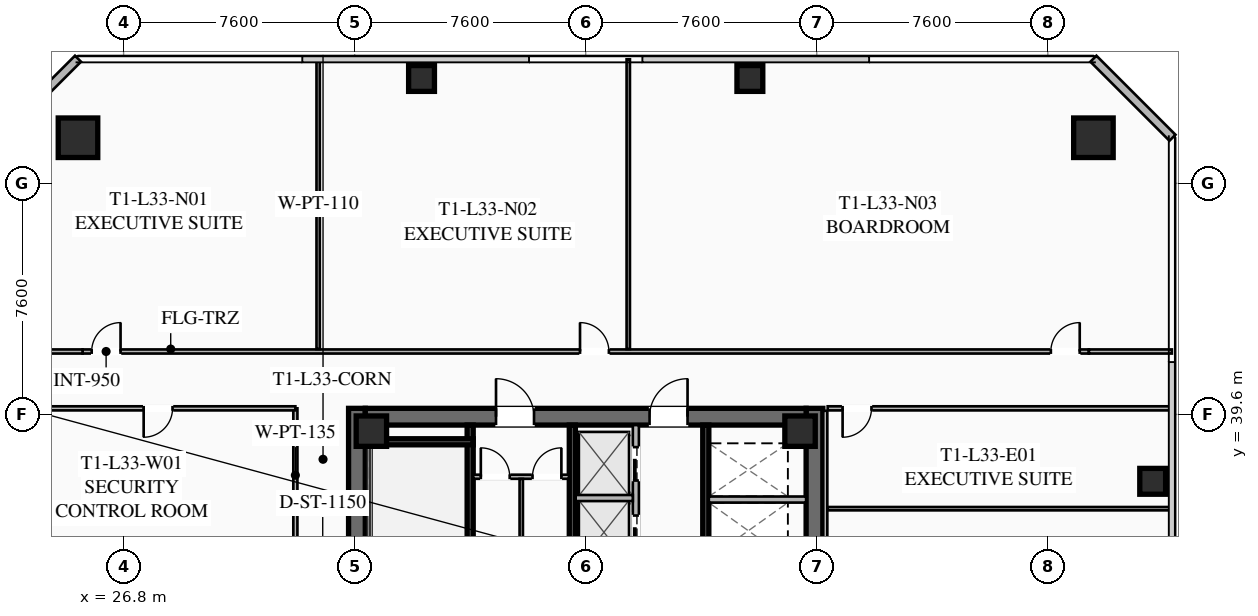
"""IFC4 building model, lengths in metres.
Left out: names, types, materials, properties, quantities, classifications, styles, units other than length and angle.
Written with IfcOpenShell. Run it as: python <this file> out.ifc"""

import sys

from ifc_helpers import new_model, si_unit, direction, frame, frame_2d, origin, origin_2d, place, context, subcontext, project, spatial, rectangle, hollow_rectangle, extrude, element, fill, save


model = new_model("IFC4")
c1 = context("Model", 3, precision=1e-05, world=origin(), true_north=direction((0.0, 1.0)))
c2 = subcontext(c1, "Body", "Model", "MODEL_VIEW")
j1 = project(units=[si_unit("LENGTHUNIT", "METRE"), si_unit("PLANEANGLEUNIT", "RADIAN")], contexts=[c1])
p1 = place(None, origin())
s1 = spatial("IfcSite", under=j1, at=p1, CompositionType="ELEMENT")
p2 = place(p1, origin())
s2 = spatial("IfcBuilding", under=s1, at=p2, CompositionType="ELEMENT")
p3 = place(p2, frame((0.0, 0.0, 125.05)))
s3 = spatial("IfcBuildingStorey", under=s2, at=p3, CompositionType="ELEMENT", Elevation=125.05)
for number, where, z_axis, x_axis in (
    (1, (34.475, 24.2, 0.0), (0.0, 0.0, 1.0), (0.0, 1.0, 0.0)),
    (2, (49.525, 39.8, 0.0), (0.0, 0.0, 1.0), (0.0, -1.0, 0.0)),
):
    element("IfcWall", number, at=place(p3, frame(where, z_axis=z_axis, x_axis=x_axis)), inside=s3, PredefinedType="SHEAR", context=c2, shape_type="SweptSolid", body=[
        extrude(rectangle(XDim=15.6, YDim=0.55, at=frame_2d((7.8, 0.0))), origin(), (0.0, 0.0, 1.0), 3.55),
    ])
p4 = place(p3, frame((34.75, 39.525, 0.0), z_axis=(0.0, 0.0, 1.0), x_axis=(1.0, 0.0, 0.0)))
e3 = element("IfcWall", 3, at=p4, inside=s3, PredefinedType="SHEAR", context=c2, shape_type="SweptSolid", body=[
    extrude(rectangle(XDim=14.5, YDim=0.55, at=frame_2d((7.25, 0.0))), origin(), (0.0, 0.0, 1.0), 3.55),
])
p5 = place(p4, frame((4.3, 0.0, 0.0)))
e4 = element("IfcOpeningElement", 4, at=p5, cuts=e3, PredefinedType="OPENING", context=c2, shape_type="SweptSolid", body=[
    extrude(rectangle(XDim=1.25, YDim=2.25, at=frame_2d((0.625, 1.125))), frame((0.0, 0.285, 0.0), z_axis=(0.0, -1.0, 0.0), x_axis=(1.0, 0.0, 0.0)), (0.0, 0.0, 1.0), 0.57),
])
p6 = place(p4, frame((9.35, 0.0, 0.0)))
e5 = element("IfcOpeningElement", 5, at=p6, cuts=e3, PredefinedType="OPENING", context=c2, shape_type="SweptSolid", body=[
    extrude(rectangle(XDim=1.25, YDim=2.25, at=frame_2d((0.625, 1.125))), frame((0.0, 0.285, 0.0), z_axis=(0.0, -1.0, 0.0), x_axis=(1.0, 0.0, 0.0)), (0.0, 0.0, 1.0), 0.57),
])
for number, where, z_axis, x_axis in (
    (6, (49.05, 39.05, 0.0), (0.0, 0.0, 1.0), (1.0, 0.0, 0.0)),
    (7, (34.95, 39.05, 0.0), (0.0, 0.0, 1.0), (1.0, 0.0, 0.0)),
):
    element("IfcColumn", number, at=place(p3, frame(where, z_axis=z_axis, x_axis=x_axis)), inside=s3, PredefinedType="COLUMN", context=c2, shape_type="SweptSolid", body=[
        extrude(hollow_rectangle(XDim=1.0, YDim=1.0, WallThickness=0.04, at=origin_2d()), origin(), (0.0, 0.0, 1.0), 3.37),
    ])
for number, where, z_axis, x_axis in (
    (8, (58.7, 48.7, 0.0), (0.0, 0.0, 1.0), (1.0, 0.0, 0.0)),
    (9, (25.3, 48.7, 0.0), (0.0, 0.0, 1.0), (1.0, 0.0, 0.0)),
):
    element("IfcColumn", number, at=place(p3, frame(where, z_axis=z_axis, x_axis=x_axis)), inside=s3, PredefinedType="COLUMN", context=c2, shape_type="SweptSolid", body=[
        extrude(hollow_rectangle(XDim=1.3, YDim=1.3, WallThickness=0.05, at=origin_2d()), origin(), (0.0, 0.0, 1.0), 3.37),
    ])
for number, where, z_axis, x_axis in (
    (10, (60.65, 37.4, 0.0), (0.0, 0.0, 1.0), (1.0, 0.0, 0.0)),
    (11, (47.4, 50.65, 0.0), (0.0, 0.0, 1.0), (1.0, 0.0, 0.0)),
    (12, (36.6, 50.65, 0.0), (0.0, 0.0, 1.0), (1.0, 0.0, 0.0)),
):
    element("IfcColumn", number, at=place(p3, frame(where, z_axis=z_axis, x_axis=x_axis)), inside=s3, PredefinedType="COLUMN", context=c2, shape_type="SweptSolid", body=[
        extrude(hollow_rectangle(XDim=0.85, YDim=0.85, WallThickness=0.035, at=origin_2d()), origin(), (0.0, 0.0, 1.0), 3.37),
    ])
for number, where, z_axis, x_axis in (
    (13, (22.7, 48.7, 0.0), (0.0, 0.0, 1.0), (0.707, 0.707, 0.0)),
    (14, (58.7, 51.3, 0.0), (0.0, 0.0, 1.0), (0.707, -0.707, 0.0)),
):
    element("IfcWall", number, at=place(p3, frame(where, z_axis=z_axis, x_axis=x_axis)), inside=s3, PredefinedType="SOLIDWALL", context=c2, shape_type="SweptSolid", body=[
        extrude(rectangle(XDim=3.677, YDim=0.28, at=frame_2d((1.838, 0.0))), origin(), (0.0, 0.0, 1.0), 3.37),
    ])
p7 = place(p3, frame((38.2, 31.2, 0.0), z_axis=(0.0, 0.0, 1.0), x_axis=(0.0, 1.0, 0.0)))
e15 = element("IfcWall", 15, at=p7, inside=s3, PredefinedType="SHEAR", context=c2, shape_type="SweptSolid", body=[
    extrude(rectangle(XDim=8.05, YDim=0.2, at=frame_2d((4.025, 0.0))), origin(), (0.0, 0.0, 1.0), 3.37),
])
p8 = place(p7, frame((0.45, 0.0, 0.0)))
e16 = element("IfcOpeningElement", 16, at=p8, cuts=e15, PredefinedType="OPENING", context=c2, shape_type="SweptSolid", body=[
    extrude(rectangle(XDim=1.15, YDim=2.2, at=frame_2d((0.575, 1.1))), frame((0.0, 0.11, 0.0), z_axis=(0.0, -1.0, 0.0), x_axis=(1.0, 0.0, 0.0)), (0.0, 0.0, 1.0), 0.22),
])
p9 = place(p3, frame((34.75, 38.7, 0.0), z_axis=(0.0, 0.0, 1.0), x_axis=(1.0, 0.0, 0.0)))
e17 = element("IfcWall", 17, at=p9, inside=s3, PredefinedType="SHEAR", context=c2, shape_type="SweptSolid", body=[
    extrude(rectangle(XDim=3.55, YDim=0.2, at=frame_2d((1.775, 0.0))), origin(), (0.0, 0.0, 1.0), 3.37),
])
p10 = place(p3, frame((41.56, 24.75, 0.0), z_axis=(0.0, 0.0, 1.0), x_axis=(0.0, 1.0, 0.0)))
e18 = element("IfcWall", 18, at=p10, inside=s3, PredefinedType="SHEAR", context=c2, shape_type="SweptSolid", body=[
    extrude(rectangle(XDim=14.5, YDim=0.2, at=frame_2d((7.25, 0.0))), origin(), (0.0, 0.0, 1.0), 3.37),
])
p11 = place(p3, frame((45.95, 39.25, 0.0), z_axis=(0.0, 0.0, 1.0), x_axis=(0.0, -1.0, 0.0)))
e19 = element("IfcWall", 19, at=p11, inside=s3, PredefinedType="SHEAR", context=c2, shape_type="SweptSolid", body=[
    extrude(rectangle(XDim=6.45, YDim=0.2, at=frame_2d((3.225, 0.0))), origin(), (0.0, 0.0, 1.0), 3.37),
])
p12 = place(p3, frame((46.05, 36.8, 0.0), z_axis=(0.0, 0.0, 1.0), x_axis=(1.0, 0.0, 0.0)))
e20 = element("IfcWall", 20, at=p12, inside=s3, PredefinedType="SOLIDWALL", context=c2, shape_type="SweptSolid", body=[
    extrude(rectangle(XDim=3.2, YDim=0.2, at=frame_2d((1.6, 0.0))), origin(), (0.0, 0.0, 1.0), 3.37),
])
p13 = place(p3, frame((38.3, 37.55, 0.0), z_axis=(0.0, 0.0, 1.0), x_axis=(1.0, 0.0, 0.0)))
e21 = element("IfcWall", 21, at=p13, inside=s3, PredefinedType="PARTITIONING", context=c2, shape_type="SweptSolid", body=[
    extrude(rectangle(XDim=3.15, YDim=0.135, at=frame_2d((1.575, 0.0))), origin(), (0.0, 0.0, 1.0), 2.723),
])
p14 = place(p13, frame((0.25, 0.0, 0.0)))
e22 = element("IfcOpeningElement", 22, at=p14, cuts=e21, PredefinedType="OPENING", context=c2, shape_type="SweptSolid", body=[
    extrude(rectangle(XDim=0.95, YDim=2.05, at=frame_2d((0.475, 1.025))), frame((0.0, 0.077, 0.0), z_axis=(0.0, -1.0, 0.0), x_axis=(1.0, 0.0, 0.0)), (0.0, 0.0, 1.0), 0.155),
])
p15 = place(p13, frame((1.95, 0.0, 0.0)))
e23 = element("IfcOpeningElement", 23, at=p15, cuts=e21, PredefinedType="OPENING", context=c2, shape_type="SweptSolid", body=[
    extrude(rectangle(XDim=0.95, YDim=2.05, at=frame_2d((0.475, 1.025))), frame((0.0, 0.077, 0.0), z_axis=(0.0, -1.0, 0.0), x_axis=(1.0, 0.0, 0.0)), (0.0, 0.0, 1.0), 0.155),
])
p16 = place(p3, frame((39.88, 33.68, 0.0), z_axis=(0.0, 0.0, 1.0), x_axis=(0.0, 1.0, 0.0)))
e24 = element("IfcWall", 24, at=p16, inside=s3, PredefinedType="PARTITIONING", context=c2, shape_type="SweptSolid", body=[
    extrude(rectangle(XDim=3.8, YDim=0.11, at=frame_2d((1.9, 0.0))), origin(), (0.0, 0.0, 1.0), 2.723),
])
p17 = place(p3, frame((43.65, 32.35, 0.0), z_axis=(0.0, 0.0, 1.0), x_axis=(0.0, 1.0, 0.0)))
e25 = element("IfcWall", 25, at=p17, inside=s3, PredefinedType="SOLIDWALL", context=c2, shape_type="SweptSolid", body=[
    extrude(rectangle(XDim=6.9, YDim=0.2, at=frame_2d((3.45, 0.0))), origin(), (0.0, 0.0, 1.0), 3.37),
])
p18 = place(p17, frame((0.575, 0.0, 0.0)))
e26 = element("IfcOpeningElement", 26, at=p18, cuts=e25, PredefinedType="OPENING", context=c2, shape_type="SweptSolid", body=[
    extrude(rectangle(XDim=1.1, YDim=2.2, at=frame_2d((0.55, 1.1))), frame((0.0, 0.11, 0.0), z_axis=(0.0, -1.0, 0.0), x_axis=(1.0, 0.0, 0.0)), (0.0, 0.0, 1.0), 0.22),
])
p19 = place(p17, frame((2.825, 0.0, 0.0)))
e27 = element("IfcOpeningElement", 27, at=p19, cuts=e25, PredefinedType="OPENING", context=c2, shape_type="SweptSolid", body=[
    extrude(rectangle(XDim=1.1, YDim=2.2, at=frame_2d((0.55, 1.1))), frame((0.0, 0.11, 0.0), z_axis=(0.0, -1.0, 0.0), x_axis=(1.0, 0.0, 0.0)), (0.0, 0.0, 1.0), 0.22),
])
p20 = place(p17, frame((5.075, 0.0, 0.0)))
e28 = element("IfcOpeningElement", 28, at=p20, cuts=e25, PredefinedType="OPENING", context=c2, shape_type="SweptSolid", body=[
    extrude(rectangle(XDim=1.1, YDim=2.2, at=frame_2d((0.55, 1.1))), frame((0.0, 0.11, 0.0), z_axis=(0.0, -1.0, 0.0), x_axis=(1.0, 0.0, 0.0)), (0.0, 0.0, 1.0), 0.22),
])
p21 = place(p3, frame((41.67, 36.85, 0.0), z_axis=(0.0, 0.0, 1.0), x_axis=(1.0, 0.0, 0.0)))
e29 = element("IfcWall", 29, at=p21, inside=s3, PredefinedType="SOLIDWALL", context=c2, shape_type="SweptSolid", body=[
    extrude(rectangle(XDim=1.88, YDim=0.2, at=frame_2d((0.94, 0.0))), origin(), (0.0, 0.0, 1.0), 3.37),
])
p22 = place(p3, frame((32.45, 35.4, 0.0), z_axis=(0.0, 0.0, 1.0), x_axis=(0.0, 1.0, 0.0)))
e30 = element("IfcWall", 30, at=p22, inside=s3, PredefinedType="PARTITIONING", context=c2, shape_type="SweptSolid", body=[
    extrude(rectangle(XDim=4.4, YDim=0.135, at=frame_2d((2.2, 0.0))), origin(), (0.0, 0.0, 1.0), 2.723),
])
p23 = place(p3, frame((25.45, 41.67, 0.0), z_axis=(0.0, 0.0, 1.0), x_axis=(1.0, 0.0, 0.0)))
e31 = element("IfcWall", 31, at=p23, inside=s3, PredefinedType="PARTITIONING", context=c2, shape_type="SweptSolid", body=[
    extrude(rectangle(XDim=33.1, YDim=0.135, at=frame_2d((16.55, 0.0))), origin(), (0.0, 0.0, 1.0), 2.723),
])
p24 = place(p23, frame((0.3, 0.0, 0.0)))
e32 = element("IfcOpeningElement", 32, at=p24, cuts=e31, PredefinedType="OPENING", context=c2, shape_type="SweptSolid", body=[
    extrude(rectangle(XDim=0.95, YDim=2.05, at=frame_2d((0.475, 1.025))), frame((0.0, 0.077, 0.0), z_axis=(0.0, -1.0, 0.0), x_axis=(1.0, 0.0, 0.0)), (0.0, 0.0, 1.0), 0.155),
])
p25 = place(p23, frame((16.363, 0.0, 0.0)))
e33 = element("IfcOpeningElement", 33, at=p25, cuts=e31, PredefinedType="OPENING", context=c2, shape_type="SweptSolid", body=[
    extrude(rectangle(XDim=0.95, YDim=2.05, at=frame_2d((0.475, 1.025))), frame((0.0, 0.077, 0.0), z_axis=(0.0, -1.0, 0.0), x_axis=(1.0, 0.0, 0.0)), (0.0, 0.0, 1.0), 0.155),
])
p26 = place(p23, frame((31.85, 0.0, 0.0)))
e34 = element("IfcOpeningElement", 34, at=p26, cuts=e31, PredefinedType="OPENING", context=c2, shape_type="SweptSolid", body=[
    extrude(rectangle(XDim=0.95, YDim=2.05, at=frame_2d((0.475, 1.025))), frame((0.0, 0.077, 0.0), z_axis=(0.0, -1.0, 0.0), x_axis=(1.0, 0.0, 0.0)), (0.0, 0.0, 1.0), 0.155),
])
for number, where, z_axis, x_axis in (
    (35, (22.72, 41.67, 0.0), (0.0, 0.0, 1.0), (1.0, 0.0, 0.0)),
    (36, (58.55, 41.67, 0.0), (0.0, 0.0, 1.0), (1.0, 0.0, 0.0)),
):
    element("IfcWall", number, at=place(p3, frame(where, z_axis=z_axis, x_axis=x_axis)), inside=s3, PredefinedType="PARTITIONING", context=c2, shape_type="SweptSolid", body=[
        extrude(rectangle(XDim=2.73, YDim=0.135, at=frame_2d((1.365, 0.0))), origin(), (0.0, 0.0, 1.0), 2.723),
    ])
for number, where, z_axis, x_axis in (
    (37, (33.2, 41.75, 0.0), (0.0, 0.0, 1.0), (0.0, 1.0, 0.0)),
    (38, (43.4, 41.75, 0.0), (0.0, 0.0, 1.0), (0.0, 1.0, 0.0)),
):
    element("IfcWall", number, at=place(p3, frame(where, z_axis=z_axis, x_axis=x_axis)), inside=s3, PredefinedType="PARTITIONING", context=c2, shape_type="SweptSolid", body=[
        extrude(rectangle(XDim=9.53, YDim=0.11, at=frame_2d((4.765, 0.0))), origin(), (0.0, 0.0, 1.0), 2.723),
    ])
p27 = place(p3, frame((49.88, 39.72, 0.0), z_axis=(0.0, 0.0, 1.0), x_axis=(0.0, -1.0, 0.0)))
e39 = element("IfcWall", 39, at=p27, inside=s3, PredefinedType="PARTITIONING", context=c2, shape_type="SweptSolid", body=[
    extrude(rectangle(XDim=15.44, YDim=0.135, at=frame_2d((7.72, 0.0))), origin(), (0.0, 0.0, 1.0), 2.723),
])
p28 = place(p3, frame((61.28, 39.8, 0.0), z_axis=(0.0, 0.0, 1.0), x_axis=(-1.0, 0.0, 0.0)))
e40 = element("IfcWall", 40, at=p28, inside=s3, PredefinedType="PARTITIONING", context=c2, shape_type="SweptSolid", body=[
    extrude(rectangle(XDim=11.32, YDim=0.135, at=frame_2d((5.66, 0.0))), origin(), (0.0, 0.0, 1.0), 2.723),
])
p29 = place(p28, frame((9.88, 0.0, 0.0)))
e41 = element("IfcOpeningElement", 41, at=p29, cuts=e40, PredefinedType="OPENING", context=c2, shape_type="SweptSolid", body=[
    extrude(rectangle(XDim=0.95, YDim=2.05, at=frame_2d((0.475, 1.025))), frame((0.0, 0.077, 0.0), z_axis=(0.0, -1.0, 0.0), x_axis=(1.0, 0.0, 0.0)), (0.0, 0.0, 1.0), 0.155),
])
p30 = place(p3, frame((49.96, 36.5, 0.0), z_axis=(0.0, 0.0, 1.0), x_axis=(1.0, 0.0, 0.0)))
e42 = element("IfcWall", 42, at=p30, inside=s3, PredefinedType="PARTITIONING", context=c2, shape_type="SweptSolid", body=[
    extrude(rectangle(XDim=11.32, YDim=0.11, at=frame_2d((5.66, 0.0))), origin(), (0.0, 0.0, 1.0), 2.723),
])
p31 = place(p3, frame((32.45, 39.8, 0.0), z_axis=(0.0, 0.0, 1.0), x_axis=(-1.0, 0.0, 0.0)))
e43 = element("IfcWall", 43, at=p31, inside=s3, PredefinedType="PARTITIONING", context=c2, shape_type="SweptSolid", body=[
    extrude(rectangle(XDim=9.73, YDim=0.135, at=frame_2d((4.865, 0.0))), origin(), (0.0, 0.0, 1.0), 2.723),
])
p32 = place(p31, frame((4.04, 0.0, 0.0)))
e44 = element("IfcOpeningElement", 44, at=p32, cuts=e43, PredefinedType="OPENING", context=c2, shape_type="SweptSolid", body=[
    extrude(rectangle(XDim=0.95, YDim=2.05, at=frame_2d((0.475, 1.025))), frame((0.0, 0.077, 0.0), z_axis=(0.0, -1.0, 0.0), x_axis=(1.0, 0.0, 0.0)), (0.0, 0.0, 1.0), 0.155),
])
p33 = place(p5, origin())
e45 = element("IfcDoor", 45, at=p33, inside=s3, OperationType="SINGLE_SWING_LEFT", PredefinedType="DOOR", context=c2, shape_type="SweptSolid", body=[
    extrude(rectangle(XDim=1.25, YDim=2.25, at=frame_2d((0.625, 1.125))), frame((0.0, 0.025, 0.0), z_axis=(0.0, -1.0, 0.0), x_axis=(1.0, 0.0, 0.0)), (0.0, 0.0, 1.0), 0.05),
])
fill(e4, e45)
p34 = place(p6, origin())
e46 = element("IfcDoor", 46, at=p34, inside=s3, OperationType="SINGLE_SWING_RIGHT", PredefinedType="DOOR", context=c2, shape_type="SweptSolid", body=[
    extrude(rectangle(XDim=1.25, YDim=2.25, at=frame_2d((0.625, 1.125))), frame((0.0, 0.025, 0.0), z_axis=(0.0, -1.0, 0.0), x_axis=(1.0, 0.0, 0.0)), (0.0, 0.0, 1.0), 0.05),
])
fill(e5, e46)
p35 = place(p14, origin())
e47 = element("IfcDoor", 47, at=p35, inside=s3, OperationType="SINGLE_SWING_LEFT", PredefinedType="DOOR", context=c2, shape_type="SweptSolid", body=[
    extrude(rectangle(XDim=0.95, YDim=2.05, at=frame_2d((0.475, 1.025))), frame((0.0, 0.025, 0.0), z_axis=(0.0, -1.0, 0.0), x_axis=(1.0, 0.0, 0.0)), (0.0, 0.0, 1.0), 0.05),
])
fill(e22, e47)
p36 = place(p15, origin())
e48 = element("IfcDoor", 48, at=p36, inside=s3, OperationType="SINGLE_SWING_RIGHT", PredefinedType="DOOR", context=c2, shape_type="SweptSolid", body=[
    extrude(rectangle(XDim=0.95, YDim=2.05, at=frame_2d((0.475, 1.025))), frame((0.0, 0.025, 0.0), z_axis=(0.0, -1.0, 0.0), x_axis=(1.0, 0.0, 0.0)), (0.0, 0.0, 1.0), 0.05),
])
fill(e23, e48)
p37 = place(p24, origin())
e49 = element("IfcDoor", 49, at=p37, inside=s3, OperationType="SINGLE_SWING_RIGHT", PredefinedType="DOOR", context=c2, shape_type="SweptSolid", body=[
    extrude(rectangle(XDim=0.95, YDim=2.05, at=frame_2d((0.475, 1.025))), frame((0.0, 0.025, 0.0), z_axis=(0.0, -1.0, 0.0), x_axis=(1.0, 0.0, 0.0)), (0.0, 0.0, 1.0), 0.05),
])
fill(e32, e49)
p38 = place(p25, origin())
e50 = element("IfcDoor", 50, at=p38, inside=s3, OperationType="SINGLE_SWING_LEFT", PredefinedType="DOOR", context=c2, shape_type="SweptSolid", body=[
    extrude(rectangle(XDim=0.95, YDim=2.05, at=frame_2d((0.475, 1.025))), frame((0.0, 0.025, 0.0), z_axis=(0.0, -1.0, 0.0), x_axis=(1.0, 0.0, 0.0)), (0.0, 0.0, 1.0), 0.05),
])
fill(e33, e50)
p39 = place(p26, origin())
e51 = element("IfcDoor", 51, at=p39, inside=s3, OperationType="SINGLE_SWING_RIGHT", PredefinedType="DOOR", context=c2, shape_type="SweptSolid", body=[
    extrude(rectangle(XDim=0.95, YDim=2.05, at=frame_2d((0.475, 1.025))), frame((0.0, 0.025, 0.0), z_axis=(0.0, -1.0, 0.0), x_axis=(1.0, 0.0, 0.0)), (0.0, 0.0, 1.0), 0.05),
])
fill(e34, e51)
p40 = place(p29, origin())
e52 = element("IfcDoor", 52, at=p40, inside=s3, OperationType="SINGLE_SWING_RIGHT", PredefinedType="DOOR", context=c2, shape_type="SweptSolid", body=[
    extrude(rectangle(XDim=0.95, YDim=2.05, at=frame_2d((0.475, 1.025))), frame((0.0, 0.025, 0.0), z_axis=(0.0, -1.0, 0.0), x_axis=(1.0, 0.0, 0.0)), (0.0, 0.0, 1.0), 0.05),
])
fill(e41, e52)
p41 = place(p32, origin())
e53 = element("IfcDoor", 53, at=p41, inside=s3, OperationType="SINGLE_SWING_RIGHT", PredefinedType="DOOR", context=c2, shape_type="SweptSolid", body=[
    extrude(rectangle(XDim=0.95, YDim=2.05, at=frame_2d((0.475, 1.025))), frame((0.0, 0.025, 0.0), z_axis=(0.0, -1.0, 0.0), x_axis=(1.0, 0.0, 0.0)), (0.0, 0.0, 1.0), 0.05),
])
fill(e44, e53)
p42 = place(p19, origin())
e54 = element("IfcDoor", 54, at=p42, inside=s3, OperationType="SLIDING_TO_LEFT", PredefinedType="DOOR", context=c2, shape_type="SweptSolid", body=[
    extrude(rectangle(XDim=1.1, YDim=2.2, at=frame_2d((0.55, 1.1))), frame((0.0, 0.025, 0.0), z_axis=(0.0, -1.0, 0.0), x_axis=(1.0, 0.0, 0.0)), (0.0, 0.0, 1.0), 0.05),
])
fill(e27, e54)
p43 = place(p20, origin())
e55 = element("IfcDoor", 55, at=p43, inside=s3, OperationType="SLIDING_TO_LEFT", PredefinedType="DOOR", context=c2, shape_type="SweptSolid", body=[
    extrude(rectangle(XDim=1.1, YDim=2.2, at=frame_2d((0.55, 1.1))), frame((0.0, 0.025, 0.0), z_axis=(0.0, -1.0, 0.0), x_axis=(1.0, 0.0, 0.0)), (0.0, 0.0, 1.0), 0.05),
])
fill(e28, e55)
save(model, sys.argv[1])
